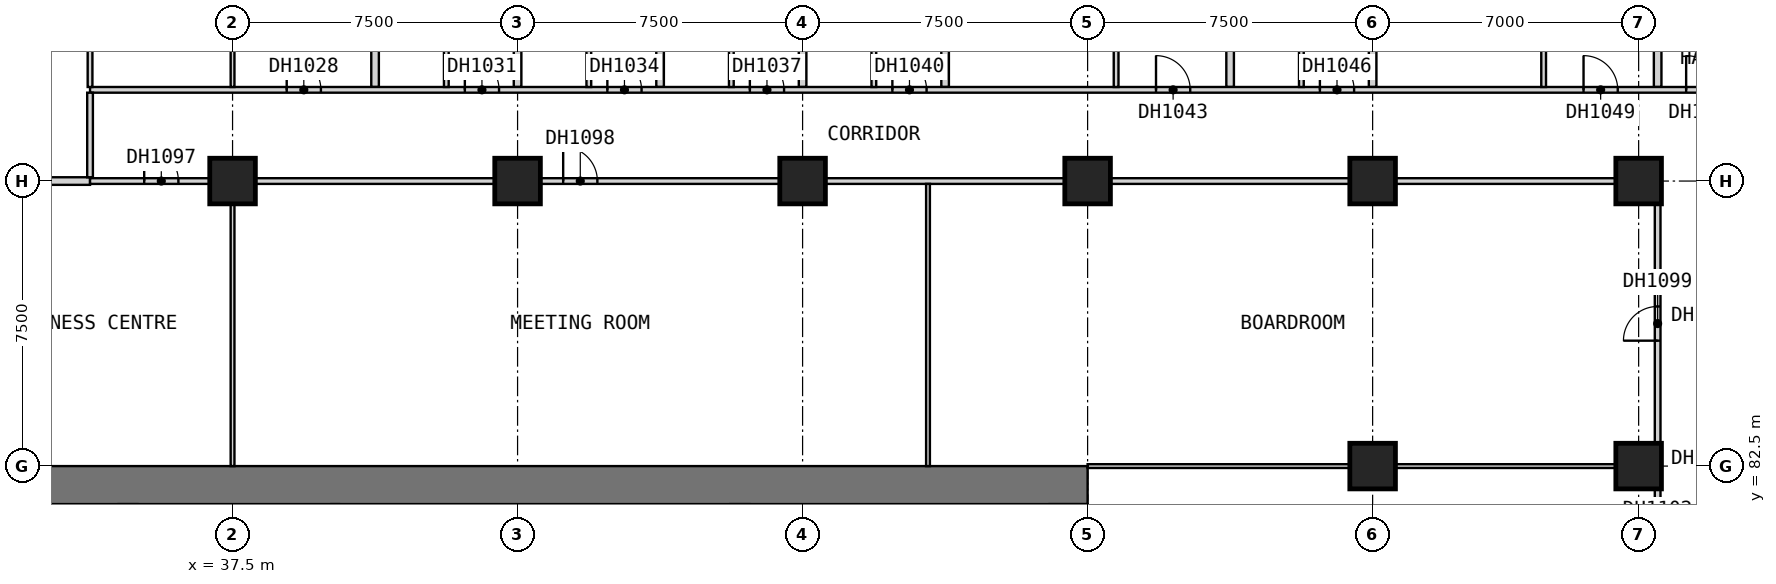
"""IFC4 building model, lengths in metres.
Left out: names, types, materials, properties, quantities, classifications, styles, units other than length and angle.
Written with IfcOpenShell. Run it as: python <this file> out.ifc"""

import sys

from ifc_helpers import new_model, si_unit, direction, frame, frame_2d, origin, origin_2d, place, context, subcontext, project, spatial, rectangle, extrude, element, fill, save


model = new_model("IFC4")
c1 = context("Model", 3, precision=1e-05, world=origin(), true_north=direction((0.0, 1.0)))
c2 = subcontext(c1, "Body", "Model", "MODEL_VIEW")
j1 = project(units=[si_unit("LENGTHUNIT", "METRE"), si_unit("PLANEANGLEUNIT", "RADIAN")], contexts=[c1])
p1 = place(None, origin())
s1 = spatial("IfcSite", under=j1, at=p1, CompositionType="ELEMENT")
p2 = place(p1, origin())
s2 = spatial("IfcBuilding", under=s1, at=p2, CompositionType="ELEMENT")
p3 = place(p2, frame((0.0, 0.0, 34.0)))
s3 = spatial("IfcBuildingStorey", under=s2, at=p3, CompositionType="ELEMENT", Elevation=34.0)
for number, where, z_axis, x_axis in (
    (1, (37.5, 90.0, 0.0), (0.0, 0.0, 1.0), (1.0, 0.0, 0.0)),
    (2, (45.0, 90.0, 0.0), (0.0, 0.0, 1.0), (1.0, 0.0, 0.0)),
    (3, (52.5, 90.0, 0.0), (0.0, 0.0, 1.0), (1.0, 0.0, 0.0)),
    (4, (60.0, 90.0, 0.0), (0.0, 0.0, 1.0), (1.0, 0.0, 0.0)),
    (5, (67.5, 82.5, 0.0), (0.0, 0.0, 1.0), (1.0, 0.0, 0.0)),
    (6, (67.5, 90.0, 0.0), (0.0, 0.0, 1.0), (1.0, 0.0, 0.0)),
    (7, (74.5, 82.5, 0.0), (0.0, 0.0, 1.0), (1.0, 0.0, 0.0)),
    (8, (74.5, 90.0, 0.0), (0.0, 0.0, 1.0), (1.0, 0.0, 0.0)),
):
    element("IfcColumn", number, at=place(p3, frame(where, z_axis=z_axis, x_axis=x_axis)), inside=s3, PredefinedType="COLUMN", context=c2, shape_type="SweptSolid", body=[
        extrude(rectangle(XDim=1.2, YDim=1.2, at=origin_2d()), origin(), (0.0, 0.0, 1.0), 3.6),
    ])
p4 = place(p3, frame((30.0, 82.0, 0.0), z_axis=(0.0, 0.0, 1.0), x_axis=(1.0, 0.0, 0.0)))
e9 = element("IfcWall", 9, at=p4, inside=s3, PredefinedType="SHEAR", context=c2, shape_type="SweptSolid", body=[
    extrude(rectangle(XDim=30.0, YDim=1.0, at=frame_2d((15.0, 0.0))), origin(), (0.0, 0.0, 1.0), 3.6),
])
for number, where, z_axis, x_axis in (
    (10, (34.75, 78.3, 0.0), (0.0, 0.0, 1.0), (0.0, 1.0, 0.0)),
    (11, (50.85, 78.3, 0.0), (0.0, 0.0, 1.0), (0.0, 1.0, 0.0)),
):
    element("IfcWall", number, at=place(p3, frame(where, z_axis=z_axis, x_axis=x_axis)), inside=s3, PredefinedType="SHEAR", context=c2, shape_type="SweptSolid", body=[
        extrude(rectangle(XDim=3.2, YDim=0.5, at=frame_2d((1.6, 0.0))), origin(), (0.0, 0.0, 1.0), 3.6),
    ])
p5 = place(p3, frame((30.0, 90.0, 0.0), z_axis=(0.0, 0.0, 1.0), x_axis=(1.0, 0.0, 0.0)))
e12 = element("IfcWall", 12, at=p5, inside=s3, PredefinedType="PARTITIONING", context=c2, shape_type="SweptSolid", body=[
    extrude(rectangle(XDim=3.75, YDim=0.2, at=frame_2d((1.875, 0.0))), origin(), (0.0, 0.0, 1.0), 3.35),
])
p6 = place(p3, frame((41.25, 92.475, 0.0), z_axis=(0.0, 0.0, 1.0), x_axis=(0.0, 1.0, 0.0)))
e13 = element("IfcWall", 13, at=p6, inside=s3, PredefinedType="PARTITIONING", context=c2, shape_type="SweptSolid", body=[
    extrude(rectangle(XDim=11.715, YDim=0.2, at=frame_2d((5.857, 0.0))), origin(), (0.0, 0.0, 1.0), 3.35),
])
p7 = place(p3, frame((45.0, 92.475, 0.0), z_axis=(0.0, 0.0, 1.0), x_axis=(0.0, 1.0, 0.0)))
e14 = element("IfcWall", 14, at=p7, inside=s3, PredefinedType="PARTITIONING", context=c2, shape_type="SweptSolid", body=[
    extrude(rectangle(XDim=12.525, YDim=0.2, at=frame_2d((6.262, 0.0))), origin(), (0.0, 0.0, 1.0), 3.35),
])
p8 = place(p3, frame((48.75, 92.475, 0.0), z_axis=(0.0, 0.0, 1.0), x_axis=(0.0, 1.0, 0.0)))
e15 = element("IfcWall", 15, at=p8, inside=s3, PredefinedType="PARTITIONING", context=c2, shape_type="SweptSolid", body=[
    extrude(rectangle(XDim=11.715, YDim=0.2, at=frame_2d((5.857, 0.0))), origin(), (0.0, 0.0, 1.0), 3.35),
])
p9 = place(p3, frame((52.5, 92.475, 0.0), z_axis=(0.0, 0.0, 1.0), x_axis=(0.0, 1.0, 0.0)))
e16 = element("IfcWall", 16, at=p9, inside=s3, PredefinedType="PARTITIONING", context=c2, shape_type="SweptSolid", body=[
    extrude(rectangle(XDim=12.525, YDim=0.2, at=frame_2d((6.262, 0.0))), origin(), (0.0, 0.0, 1.0), 3.35),
])
for number, where, z_axis, x_axis in (
    (17, (56.25, 92.475, 0.0), (0.0, 0.0, 1.0), (0.0, 1.0, 0.0)),
    (18, (63.75, 92.475, 0.0), (0.0, 0.0, 1.0), (0.0, 1.0, 0.0)),
):
    element("IfcWall", number, at=place(p3, frame(where, z_axis=z_axis, x_axis=x_axis)), inside=s3, PredefinedType="PARTITIONING", context=c2, shape_type="SweptSolid", body=[
        extrude(rectangle(XDim=11.715, YDim=0.2, at=frame_2d((5.857, 0.0))), origin(), (0.0, 0.0, 1.0), 3.35),
    ])
p10 = place(p3, frame((67.5, 92.475, 0.0), z_axis=(0.0, 0.0, 1.0), x_axis=(0.0, 1.0, 0.0)))
e19 = element("IfcWall", 19, at=p10, inside=s3, PredefinedType="PARTITIONING", context=c2, shape_type="SweptSolid", body=[
    extrude(rectangle(XDim=12.525, YDim=0.2, at=frame_2d((6.262, 0.0))), origin(), (0.0, 0.0, 1.0), 3.35),
])
p11 = place(p3, frame((75.0, 92.475, 0.0), z_axis=(0.0, 0.0, 1.0), x_axis=(0.0, 1.0, 0.0)))
e20 = element("IfcWall", 20, at=p11, inside=s3, PredefinedType="PARTITIONING", context=c2, shape_type="SweptSolid", body=[
    extrude(rectangle(XDim=11.715, YDim=0.2, at=frame_2d((5.857, 0.0))), origin(), (0.0, 0.0, 1.0), 3.35),
])
p12 = place(p3, frame((33.75, 90.0, 0.0), z_axis=(0.0, 0.0, 1.0), x_axis=(1.0, 0.0, 0.0)))
e21 = element("IfcWall", 21, at=p12, inside=s3, PredefinedType="PARTITIONING", context=c2, shape_type="SweptSolid", body=[
    extrude(rectangle(XDim=41.25, YDim=0.15, at=frame_2d((20.625, 0.0))), origin(), (0.0, 0.0, 1.0), 3.35),
])
p13 = place(p12, frame((1.425, 0.0, 0.0)))
e22 = element("IfcOpeningElement", 22, at=p13, cuts=e21, PredefinedType="OPENING", context=c2, shape_type="SweptSolid", body=[
    extrude(rectangle(XDim=0.9, YDim=2.1, at=frame_2d((0.45, 1.05))), frame((0.0, 0.085, 0.0), z_axis=(0.0, -1.0, 0.0), x_axis=(1.0, 0.0, 0.0)), (0.0, 0.0, 1.0), 0.17),
])
p14 = place(p12, frame((12.45, 0.0, 0.0)))
e23 = element("IfcOpeningElement", 23, at=p14, cuts=e21, PredefinedType="OPENING", context=c2, shape_type="SweptSolid", body=[
    extrude(rectangle(XDim=0.9, YDim=2.1, at=frame_2d((0.45, 1.05))), frame((0.0, 0.085, 0.0), z_axis=(0.0, -1.0, 0.0), x_axis=(1.0, 0.0, 0.0)), (0.0, 0.0, 1.0), 0.17),
])
p15 = place(p3, frame((33.75, 92.4, 0.0), z_axis=(0.0, 0.0, 1.0), x_axis=(1.0, 0.0, 0.0)))
e24 = element("IfcWall", 24, at=p15, inside=s3, PredefinedType="PARTITIONING", context=c2, shape_type="SweptSolid", body=[
    extrude(rectangle(XDim=43.65, YDim=0.15, at=frame_2d((21.825, 0.0))), origin(), (0.0, 0.0, 1.0), 3.35),
])
p16 = place(p15, frame((5.175, 0.0, 0.0)))
e25 = element("IfcOpeningElement", 25, at=p16, cuts=e24, PredefinedType="OPENING", context=c2, shape_type="SweptSolid", body=[
    extrude(rectangle(XDim=0.9, YDim=2.1, at=frame_2d((0.45, 1.05))), frame((0.0, 0.085, 0.0), z_axis=(0.0, -1.0, 0.0), x_axis=(1.0, 0.0, 0.0)), (0.0, 0.0, 1.0), 0.17),
])
p17 = place(p15, frame((9.863, 0.0, 0.0)))
e26 = element("IfcOpeningElement", 26, at=p17, cuts=e24, PredefinedType="OPENING", context=c2, shape_type="SweptSolid", body=[
    extrude(rectangle(XDim=0.9, YDim=2.1, at=frame_2d((0.45, 1.05))), frame((0.0, 0.085, 0.0), z_axis=(0.0, -1.0, 0.0), x_axis=(1.0, 0.0, 0.0)), (0.0, 0.0, 1.0), 0.17),
])
p18 = place(p15, frame((13.613, 0.0, 0.0)))
e27 = element("IfcOpeningElement", 27, at=p18, cuts=e24, PredefinedType="OPENING", context=c2, shape_type="SweptSolid", body=[
    extrude(rectangle(XDim=0.9, YDim=2.1, at=frame_2d((0.45, 1.05))), frame((0.0, 0.085, 0.0), z_axis=(0.0, -1.0, 0.0), x_axis=(1.0, 0.0, 0.0)), (0.0, 0.0, 1.0), 0.17),
])
p19 = place(p15, frame((17.363, 0.0, 0.0)))
e28 = element("IfcOpeningElement", 28, at=p19, cuts=e24, PredefinedType="OPENING", context=c2, shape_type="SweptSolid", body=[
    extrude(rectangle(XDim=0.9, YDim=2.1, at=frame_2d((0.45, 1.05))), frame((0.0, 0.085, 0.0), z_axis=(0.0, -1.0, 0.0), x_axis=(1.0, 0.0, 0.0)), (0.0, 0.0, 1.0), 0.17),
])
p20 = place(p15, frame((21.113, 0.0, 0.0)))
e29 = element("IfcOpeningElement", 29, at=p20, cuts=e24, PredefinedType="OPENING", context=c2, shape_type="SweptSolid", body=[
    extrude(rectangle(XDim=0.9, YDim=2.1, at=frame_2d((0.45, 1.05))), frame((0.0, 0.085, 0.0), z_axis=(0.0, -1.0, 0.0), x_axis=(1.0, 0.0, 0.0)), (0.0, 0.0, 1.0), 0.17),
])
p21 = place(p15, frame((28.05, 0.0, 0.0)))
e30 = element("IfcOpeningElement", 30, at=p21, cuts=e24, PredefinedType="OPENING", context=c2, shape_type="SweptSolid", body=[
    extrude(rectangle(XDim=0.9, YDim=2.1, at=frame_2d((0.45, 1.05))), frame((0.0, 0.085, 0.0), z_axis=(0.0, -1.0, 0.0), x_axis=(1.0, 0.0, 0.0)), (0.0, 0.0, 1.0), 0.17),
])
p22 = place(p15, frame((32.363, 0.0, 0.0)))
e31 = element("IfcOpeningElement", 31, at=p22, cuts=e24, PredefinedType="OPENING", context=c2, shape_type="SweptSolid", body=[
    extrude(rectangle(XDim=0.9, YDim=2.1, at=frame_2d((0.45, 1.05))), frame((0.0, 0.085, 0.0), z_axis=(0.0, -1.0, 0.0), x_axis=(1.0, 0.0, 0.0)), (0.0, 0.0, 1.0), 0.17),
])
p23 = place(p15, frame((39.3, 0.0, 0.0)))
e32 = element("IfcOpeningElement", 32, at=p23, cuts=e24, PredefinedType="OPENING", context=c2, shape_type="SweptSolid", body=[
    extrude(rectangle(XDim=0.9, YDim=2.1, at=frame_2d((0.45, 1.05))), frame((0.0, 0.085, 0.0), z_axis=(0.0, -1.0, 0.0), x_axis=(1.0, 0.0, 0.0)), (0.0, 0.0, 1.0), 0.17),
])
p24 = place(p15, frame((42.0, 0.0, 0.0)))
e33 = element("IfcOpeningElement", 33, at=p24, cuts=e24, PredefinedType="OPENING", context=c2, shape_type="SweptSolid", body=[
    extrude(rectangle(XDim=0.9, YDim=2.1, at=frame_2d((0.45, 1.05))), frame((0.0, 0.085, 0.0), z_axis=(0.0, -1.0, 0.0), x_axis=(1.0, 0.0, 0.0)), (0.0, 0.0, 1.0), 0.17),
])
p25 = place(p3, frame((33.75, 90.1, 0.0), z_axis=(0.0, 0.0, 1.0), x_axis=(0.0, 1.0, 0.0)))
e34 = element("IfcWall", 34, at=p25, inside=s3, PredefinedType="PARTITIONING", context=c2, shape_type="SweptSolid", body=[
    extrude(rectangle(XDim=2.225, YDim=0.15, at=frame_2d((1.112, 0.0))), origin(), (0.0, 0.0, 1.0), 3.35),
])
p26 = place(p3, frame((75.0, 78.075, 0.0), z_axis=(0.0, 0.0, 1.0), x_axis=(0.0, 1.0, 0.0)))
e35 = element("IfcWall", 35, at=p26, inside=s3, PredefinedType="PARTITIONING", context=c2, shape_type="SweptSolid", body=[
    extrude(rectangle(XDim=11.85, YDim=0.15, at=frame_2d((5.925, 0.0))), origin(), (0.0, 0.0, 1.0), 3.35),
])
p27 = place(p26, frame((7.725, 0.0, 0.0)))
e36 = element("IfcOpeningElement", 36, at=p27, cuts=e35, PredefinedType="OPENING", context=c2, shape_type="SweptSolid", body=[
    extrude(rectangle(XDim=0.9, YDim=2.1, at=frame_2d((0.45, 1.05))), frame((0.0, 0.085, 0.0), z_axis=(0.0, -1.0, 0.0), x_axis=(1.0, 0.0, 0.0)), (0.0, 0.0, 1.0), 0.17),
])
p28 = place(p26, frame((1.725, 0.0, 0.0)))
e37 = element("IfcOpeningElement", 37, at=p28, cuts=e35, PredefinedType="OPENING", context=c2, shape_type="SweptSolid", body=[
    extrude(rectangle(XDim=0.9, YDim=2.1, at=frame_2d((0.45, 1.05))), frame((0.0, 0.085, 0.0), z_axis=(0.0, -1.0, 0.0), x_axis=(1.0, 0.0, 0.0)), (0.0, 0.0, 1.0), 0.17),
])
p29 = place(p3, frame((60.0, 82.5, 0.0), z_axis=(0.0, 0.0, 1.0), x_axis=(1.0, 0.0, 0.0)))
e38 = element("IfcWall", 38, at=p29, inside=s3, PredefinedType="PARTITIONING", context=c2, shape_type="SweptSolid", body=[
    extrude(rectangle(XDim=14.925, YDim=0.1, at=frame_2d((7.462, 0.0))), origin(), (0.0, 0.0, 1.0), 3.35),
])
p30 = place(p3, frame((37.5, 82.5, 0.0), z_axis=(0.0, 0.0, 1.0), x_axis=(0.0, 1.0, 0.0)))
e39 = element("IfcWall", 39, at=p30, inside=s3, PredefinedType="PARTITIONING", context=c2, shape_type="SweptSolid", body=[
    extrude(rectangle(XDim=7.425, YDim=0.1, at=frame_2d((3.712, 0.0))), origin(), (0.0, 0.0, 1.0), 3.35),
])
p31 = place(p3, frame((37.5, 92.475, 0.0), z_axis=(0.0, 0.0, 1.0), x_axis=(0.0, 1.0, 0.0)))
e40 = element("IfcWall", 40, at=p31, inside=s3, PredefinedType="PARTITIONING", context=c2, shape_type="SweptSolid", body=[
    extrude(rectangle(XDim=4.225, YDim=0.1, at=frame_2d((2.112, 0.0))), origin(), (0.0, 0.0, 1.0), 3.35),
])
p32 = place(p31, frame((1.65, 0.0, 0.0)))
e41 = element("IfcOpeningElement", 41, at=p32, cuts=e40, PredefinedType="OPENING", context=c2, shape_type="SweptSolid", body=[
    extrude(rectangle(XDim=0.9, YDim=2.1, at=frame_2d((0.45, 1.05))), frame((0.0, 0.06, 0.0), z_axis=(0.0, -1.0, 0.0), x_axis=(1.0, 0.0, 0.0)), (0.0, 0.0, 1.0), 0.12),
])
p33 = place(p3, frame((55.8, 82.5, 0.0), z_axis=(0.0, 0.0, 1.0), x_axis=(0.0, 1.0, 0.0)))
e42 = element("IfcWall", 42, at=p33, inside=s3, PredefinedType="PARTITIONING", context=c2, shape_type="SweptSolid", body=[
    extrude(rectangle(XDim=7.425, YDim=0.1, at=frame_2d((3.712, 0.0))), origin(), (0.0, 0.0, 1.0), 3.35),
])
for number, where, z_axis, x_axis in (
    (43, (33.75, 92.475, 0.0), (0.0, 0.0, 1.0), (0.0, 1.0, 0.0)),
    (44, (43.125, 92.475, 0.0), (0.0, 0.0, 1.0), (0.0, 1.0, 0.0)),
    (45, (46.875, 92.475, 0.0), (0.0, 0.0, 1.0), (0.0, 1.0, 0.0)),
    (46, (50.625, 92.475, 0.0), (0.0, 0.0, 1.0), (0.0, 1.0, 0.0)),
    (47, (54.375, 92.475, 0.0), (0.0, 0.0, 1.0), (0.0, 1.0, 0.0)),
    (48, (60.75, 92.475, 0.0), (0.0, 0.0, 1.0), (0.0, 1.0, 0.0)),
    (49, (65.625, 92.475, 0.0), (0.0, 0.0, 1.0), (0.0, 1.0, 0.0)),
    (50, (72.0, 92.475, 0.0), (0.0, 0.0, 1.0), (0.0, 1.0, 0.0)),
):
    element("IfcWall", number, at=place(p3, frame(where, z_axis=z_axis, x_axis=x_axis)), inside=s3, PredefinedType="PARTITIONING", context=c2, shape_type="SweptSolid", body=[
        extrude(rectangle(XDim=4.212, YDim=0.125, at=frame_2d((2.106, 0.0))), origin(), (0.0, 0.0, 1.0), 3.35),
    ])
p34 = place(p16, origin())
e51 = element("IfcDoor", 51, at=p34, inside=s3, OperationType="SINGLE_SWING_LEFT", PredefinedType="DOOR", context=c2, shape_type="SweptSolid", body=[
    extrude(rectangle(XDim=0.9, YDim=2.1, at=frame_2d((0.45, 1.05))), frame((0.0, 0.025, 0.0), z_axis=(0.0, -1.0, 0.0), x_axis=(1.0, 0.0, 0.0)), (0.0, 0.0, 1.0), 0.05),
])
fill(e25, e51)
p35 = place(p17, origin())
e52 = element("IfcDoor", 52, at=p35, inside=s3, OperationType="SINGLE_SWING_LEFT", PredefinedType="DOOR", context=c2, shape_type="SweptSolid", body=[
    extrude(rectangle(XDim=0.9, YDim=2.1, at=frame_2d((0.45, 1.05))), frame((0.0, 0.025, 0.0), z_axis=(0.0, -1.0, 0.0), x_axis=(1.0, 0.0, 0.0)), (0.0, 0.0, 1.0), 0.05),
])
fill(e26, e52)
p36 = place(p18, origin())
e53 = element("IfcDoor", 53, at=p36, inside=s3, OperationType="SINGLE_SWING_LEFT", PredefinedType="DOOR", context=c2, shape_type="SweptSolid", body=[
    extrude(rectangle(XDim=0.9, YDim=2.1, at=frame_2d((0.45, 1.05))), frame((0.0, 0.025, 0.0), z_axis=(0.0, -1.0, 0.0), x_axis=(1.0, 0.0, 0.0)), (0.0, 0.0, 1.0), 0.05),
])
fill(e27, e53)
p37 = place(p19, origin())
e54 = element("IfcDoor", 54, at=p37, inside=s3, OperationType="SINGLE_SWING_LEFT", PredefinedType="DOOR", context=c2, shape_type="SweptSolid", body=[
    extrude(rectangle(XDim=0.9, YDim=2.1, at=frame_2d((0.45, 1.05))), frame((0.0, 0.025, 0.0), z_axis=(0.0, -1.0, 0.0), x_axis=(1.0, 0.0, 0.0)), (0.0, 0.0, 1.0), 0.05),
])
fill(e28, e54)
p38 = place(p20, origin())
e55 = element("IfcDoor", 55, at=p38, inside=s3, OperationType="SINGLE_SWING_LEFT", PredefinedType="DOOR", context=c2, shape_type="SweptSolid", body=[
    extrude(rectangle(XDim=0.9, YDim=2.1, at=frame_2d((0.45, 1.05))), frame((0.0, 0.025, 0.0), z_axis=(0.0, -1.0, 0.0), x_axis=(1.0, 0.0, 0.0)), (0.0, 0.0, 1.0), 0.05),
])
fill(e29, e55)
p39 = place(p21, origin())
e56 = element("IfcDoor", 56, at=p39, inside=s3, OperationType="SINGLE_SWING_LEFT", PredefinedType="DOOR", context=c2, shape_type="SweptSolid", body=[
    extrude(rectangle(XDim=0.9, YDim=2.1, at=frame_2d((0.45, 1.05))), frame((0.0, 0.025, 0.0), z_axis=(0.0, -1.0, 0.0), x_axis=(1.0, 0.0, 0.0)), (0.0, 0.0, 1.0), 0.05),
])
fill(e30, e56)
p40 = place(p22, origin())
e57 = element("IfcDoor", 57, at=p40, inside=s3, OperationType="SINGLE_SWING_LEFT", PredefinedType="DOOR", context=c2, shape_type="SweptSolid", body=[
    extrude(rectangle(XDim=0.9, YDim=2.1, at=frame_2d((0.45, 1.05))), frame((0.0, 0.025, 0.0), z_axis=(0.0, -1.0, 0.0), x_axis=(1.0, 0.0, 0.0)), (0.0, 0.0, 1.0), 0.05),
])
fill(e31, e57)
p41 = place(p23, origin())
e58 = element("IfcDoor", 58, at=p41, inside=s3, OperationType="SINGLE_SWING_LEFT", PredefinedType="DOOR", context=c2, shape_type="SweptSolid", body=[
    extrude(rectangle(XDim=0.9, YDim=2.1, at=frame_2d((0.45, 1.05))), frame((0.0, 0.025, 0.0), z_axis=(0.0, -1.0, 0.0), x_axis=(1.0, 0.0, 0.0)), (0.0, 0.0, 1.0), 0.05),
])
fill(e32, e58)
p42 = place(p24, origin())
e59 = element("IfcDoor", 59, at=p42, inside=s3, OperationType="SINGLE_SWING_RIGHT", PredefinedType="DOOR", context=c2, shape_type="SweptSolid", body=[
    extrude(rectangle(XDim=0.9, YDim=2.1, at=frame_2d((0.45, 1.05))), frame((0.0, 0.025, 0.0), z_axis=(0.0, -1.0, 0.0), x_axis=(1.0, 0.0, 0.0)), (0.0, 0.0, 1.0), 0.05),
])
fill(e33, e59)
p43 = place(p13, origin())
e60 = element("IfcDoor", 60, at=p43, inside=s3, OperationType="SINGLE_SWING_RIGHT", PredefinedType="DOOR", context=c2, shape_type="SweptSolid", body=[
    extrude(rectangle(XDim=0.9, YDim=2.1, at=frame_2d((0.45, 1.05))), frame((0.0, 0.025, 0.0), z_axis=(0.0, -1.0, 0.0), x_axis=(1.0, 0.0, 0.0)), (0.0, 0.0, 1.0), 0.05),
])
fill(e22, e60)
p44 = place(p14, origin())
e61 = element("IfcDoor", 61, at=p44, inside=s3, OperationType="SINGLE_SWING_RIGHT", PredefinedType="DOOR", context=c2, shape_type="SweptSolid", body=[
    extrude(rectangle(XDim=0.9, YDim=2.1, at=frame_2d((0.45, 1.05))), frame((0.0, 0.025, 0.0), z_axis=(0.0, -1.0, 0.0), x_axis=(1.0, 0.0, 0.0)), (0.0, 0.0, 1.0), 0.05),
])
fill(e23, e61)
p45 = place(p27, origin())
e62 = element("IfcDoor", 62, at=p45, inside=s3, OperationType="SINGLE_SWING_LEFT", PredefinedType="DOOR", context=c2, shape_type="SweptSolid", body=[
    extrude(rectangle(XDim=0.9, YDim=2.1, at=frame_2d((0.45, 1.05))), frame((0.0, 0.025, 0.0), z_axis=(0.0, -1.0, 0.0), x_axis=(1.0, 0.0, 0.0)), (0.0, 0.0, 1.0), 0.05),
])
fill(e36, e62)
save(model, sys.argv[1])
